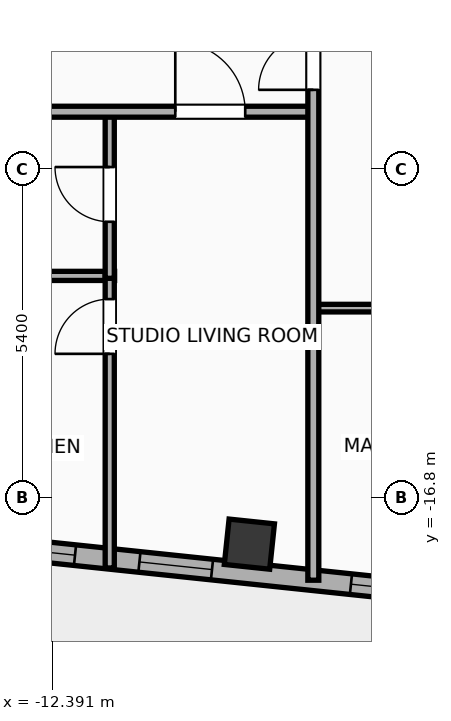
"""IFC4 building model, lengths in metres.
Left out: names, types, materials, properties, quantities, classifications, styles, units other than length and angle.
Written with IfcOpenShell. Run it as: python <this file> out.ifc"""

import sys

from ifc_helpers import new_model, si_unit, direction, frame, frame_2d, origin, origin_2d, place, context, subcontext, project, spatial, rectangle, hollow_rectangle, extrude, element, fill, save


model = new_model("IFC4")
c1 = context("Model", 3, precision=1e-05, world=origin(), true_north=direction((0.0, 1.0)))
c2 = subcontext(c1, "Body", "Model", "MODEL_VIEW")
j1 = project(units=[si_unit("LENGTHUNIT", "METRE"), si_unit("PLANEANGLEUNIT", "RADIAN")], contexts=[c1])
p1 = place(None, origin())
s1 = spatial("IfcSite", under=j1, at=p1, CompositionType="ELEMENT")
p2 = place(p1, origin())
s2 = spatial("IfcBuilding", under=s1, at=p2, CompositionType="ELEMENT")
p3 = place(p2, frame((0.0, 0.0, 291.2)))
s3 = spatial("IfcBuildingStorey", under=s2, at=p3, CompositionType="ELEMENT", Elevation=291.2)
p4 = place(p3, frame((-9.152, -17.561, 0.0), z_axis=(0.0, 0.0, 1.0), x_axis=(0.994521895368, -0.104528463268, 0.0)))
e1 = element("IfcColumn", 1, at=p4, inside=s3, PredefinedType="COLUMN", context=c2, shape_type="SweptSolid", body=[
    extrude(hollow_rectangle(XDim=0.75, YDim=0.75, WallThickness=0.025, at=origin_2d()), origin(), (0.0, 0.0, 1.0), 3.9),
])
p5 = place(p3, frame((18.708, -20.972, 0.0), z_axis=(0.0, 0.0, 1.0), x_axis=(-0.994521888554, 0.104528528102, 0.0)))
e2 = element("IfcWall", 2, at=p5, inside=s3, PredefinedType="ELEMENTEDWALL", context=c2, shape_type="SweptSolid", body=[
    extrude(rectangle(XDim=46.766, YDim=0.34, at=frame_2d((23.383, 0.0))), origin(), (0.0, 0.0, 1.0), 3.635),
])
p6 = place(p5, frame((23.733, 0.0, 0.65)))
e3 = element("IfcOpeningElement", 3, at=p6, cuts=e2, PredefinedType="OPENING", context=c2, shape_type="SweptSolid", body=[
    extrude(rectangle(XDim=2.6, YDim=2.45, at=frame_2d((1.3, 1.225))), frame((0.0, 0.18, 0.0), z_axis=(0.0, -1.0, 0.0), x_axis=(1.0, 0.0, 0.0)), (0.0, 0.0, 1.0), 0.36),
])
p7 = place(p5, frame((44.402, 0.0, 0.75)))
e4 = element("IfcOpeningElement", 4, at=p7, cuts=e2, PredefinedType="OPENING", context=c2, shape_type="SweptSolid", body=[
    extrude(rectangle(XDim=1.2, YDim=2.05, at=frame_2d((0.6, 1.025))), frame((0.0, 0.18, 0.0), z_axis=(0.0, -1.0, 0.0), x_axis=(1.0, 0.0, 0.0)), (0.0, 0.0, 1.0), 0.36),
])
p8 = place(p5, frame((39.54, 0.0, 0.75)))
e5 = element("IfcOpeningElement", 5, at=p8, cuts=e2, PredefinedType="OPENING", context=c2, shape_type="SweptSolid", body=[
    extrude(rectangle(XDim=1.2, YDim=2.05, at=frame_2d((0.6, 1.025))), frame((0.0, 0.18, 0.0), z_axis=(0.0, -1.0, 0.0), x_axis=(1.0, 0.0, 0.0)), (0.0, 0.0, 1.0), 0.36),
])
p9 = place(p5, frame((42.406, 0.0, 0.75)))
e6 = element("IfcOpeningElement", 6, at=p9, cuts=e2, PredefinedType="OPENING", context=c2, shape_type="SweptSolid", body=[
    extrude(rectangle(XDim=1.2, YDim=2.05, at=frame_2d((0.6, 1.025))), frame((0.0, 0.18, 0.0), z_axis=(0.0, -1.0, 0.0), x_axis=(1.0, 0.0, 0.0)), (0.0, 0.0, 1.0), 0.36),
])
p10 = place(p5, frame((34.933, 0.0, 0.75)))
e7 = element("IfcOpeningElement", 7, at=p10, cuts=e2, PredefinedType="OPENING", context=c2, shape_type="SweptSolid", body=[
    extrude(rectangle(XDim=1.2, YDim=2.05, at=frame_2d((0.6, 1.025))), frame((0.0, 0.18, 0.0), z_axis=(0.0, -1.0, 0.0), x_axis=(1.0, 0.0, 0.0)), (0.0, 0.0, 1.0), 0.36),
])
p11 = place(p5, frame((28.631, 0.0, 0.75)))
e8 = element("IfcOpeningElement", 8, at=p11, cuts=e2, PredefinedType="OPENING", context=c2, shape_type="SweptSolid", body=[
    extrude(rectangle(XDim=1.2, YDim=2.05, at=frame_2d((0.6, 1.025))), frame((0.0, 0.18, 0.0), z_axis=(0.0, -1.0, 0.0), x_axis=(1.0, 0.0, 0.0)), (0.0, 0.0, 1.0), 0.36),
])
p12 = place(p5, frame((30.896, 0.0, 0.75)))
e9 = element("IfcOpeningElement", 9, at=p12, cuts=e2, PredefinedType="OPENING", context=c2, shape_type="SweptSolid", body=[
    extrude(rectangle(XDim=1.2, YDim=2.05, at=frame_2d((0.6, 1.025))), frame((0.0, 0.18, 0.0), z_axis=(0.0, -1.0, 0.0), x_axis=(1.0, 0.0, 0.0)), (0.0, 0.0, 1.0), 0.36),
])
p13 = place(p5, frame((7.501, 0.0, 0.75)))
e10 = element("IfcOpeningElement", 10, at=p13, cuts=e2, PredefinedType="OPENING", context=c2, shape_type="SweptSolid", body=[
    extrude(rectangle(XDim=1.2, YDim=2.05, at=frame_2d((0.6, 1.025))), frame((0.0, 0.18, 0.0), z_axis=(0.0, -1.0, 0.0), x_axis=(1.0, 0.0, 0.0)), (0.0, 0.0, 1.0), 0.36),
])
p14 = place(p5, frame((4.159, 0.0, 0.75)))
e11 = element("IfcOpeningElement", 11, at=p14, cuts=e2, PredefinedType="OPENING", context=c2, shape_type="SweptSolid", body=[
    extrude(rectangle(XDim=1.2, YDim=2.05, at=frame_2d((0.6, 1.025))), frame((0.0, 0.18, 0.0), z_axis=(0.0, -1.0, 0.0), x_axis=(1.0, 0.0, 0.0)), (0.0, 0.0, 1.0), 0.36),
])
p15 = place(p5, frame((1.369, 0.0, 0.75)))
e12 = element("IfcOpeningElement", 12, at=p15, cuts=e2, PredefinedType="OPENING", context=c2, shape_type="SweptSolid", body=[
    extrude(rectangle(XDim=1.2, YDim=2.05, at=frame_2d((0.6, 1.025))), frame((0.0, 0.18, 0.0), z_axis=(0.0, -1.0, 0.0), x_axis=(1.0, 0.0, 0.0)), (0.0, 0.0, 1.0), 0.36),
])
p16 = place(p5, frame((20.254, 0.0, 0.75)))
e13 = element("IfcOpeningElement", 13, at=p16, cuts=e2, PredefinedType="OPENING", context=c2, shape_type="SweptSolid", body=[
    extrude(rectangle(XDim=1.2, YDim=2.05, at=frame_2d((0.6, 1.025))), frame((0.0, 0.18, 0.0), z_axis=(0.0, -1.0, 0.0), x_axis=(1.0, 0.0, 0.0)), (0.0, 0.0, 1.0), 0.36),
])
p17 = place(p5, frame((16.172, 0.0, 0.75)))
e14 = element("IfcOpeningElement", 14, at=p17, cuts=e2, PredefinedType="OPENING", context=c2, shape_type="SweptSolid", body=[
    extrude(rectangle(XDim=1.2, YDim=2.05, at=frame_2d((0.6, 1.025))), frame((0.0, 0.18, 0.0), z_axis=(0.0, -1.0, 0.0), x_axis=(1.0, 0.0, 0.0)), (0.0, 0.0, 1.0), 0.36),
])
p18 = place(p5, frame((12.11, 0.0, 0.75)))
e15 = element("IfcOpeningElement", 15, at=p18, cuts=e2, PredefinedType="OPENING", context=c2, shape_type="SweptSolid", body=[
    extrude(rectangle(XDim=1.2, YDim=2.05, at=frame_2d((0.6, 1.025))), frame((0.0, 0.18, 0.0), z_axis=(0.0, -1.0, 0.0), x_axis=(1.0, 0.0, 0.0)), (0.0, 0.0, 1.0), 0.36),
])
p19 = place(p3, frame((-14.039, -13.15, 0.0), z_axis=(0.0, 0.0, 1.0), x_axis=(1.0, 0.0, 0.0)))
e16 = element("IfcWall", 16, at=p19, inside=s3, PredefinedType="PLUMBINGWALL", context=c2, shape_type="SweptSolid", body=[
    extrude(rectangle(XDim=2.671, YDim=0.15, at=frame_2d((1.335, 0.0))), origin(), (0.0, 0.0, 1.0), 3.635),
])
p20 = place(p3, frame((-11.448, -17.954, 0.0), z_axis=(0.0, 0.0, 1.0), x_axis=(0.0, 1.0, 0.0)))
e17 = element("IfcWall", 17, at=p20, inside=s3, PredefinedType="PLUMBINGWALL", context=c2, shape_type="SweptSolid", body=[
    extrude(rectangle(XDim=4.844, YDim=0.15, at=frame_2d((2.422, 0.0))), origin(), (0.0, 0.0, 1.0), 3.635),
])
p21 = place(p20, frame((3.522, 0.0, 0.0)))
e18 = element("IfcOpeningElement", 18, at=p21, cuts=e17, PredefinedType="OPENING", context=c2, shape_type="SweptSolid", body=[
    extrude(rectangle(XDim=0.9, YDim=2.05, at=frame_2d((0.45, 1.025))), frame((0.0, 0.085, 0.0), z_axis=(0.0, -1.0, 0.0), x_axis=(1.0, 0.0, 0.0)), (0.0, 0.0, 1.0), 0.17),
])
p22 = place(p3, frame((-11.448, -13.19, 0.0), z_axis=(0.0, 0.0, 1.0), x_axis=(0.0, 1.0, 0.0)))
e19 = element("IfcWall", 19, at=p22, inside=s3, PredefinedType="PLUMBINGWALL", context=c2, shape_type="SweptSolid", body=[
    extrude(rectangle(XDim=2.76, YDim=0.15, at=frame_2d((1.38, 0.0))), origin(), (0.0, 0.0, 1.0), 3.075),
])
p23 = place(p22, frame((0.93, 0.0, 0.0)))
e20 = element("IfcOpeningElement", 20, at=p23, cuts=e19, PredefinedType="OPENING", context=c2, shape_type="SweptSolid", body=[
    extrude(rectangle(XDim=0.9, YDim=2.05, at=frame_2d((0.45, 1.025))), frame((0.0, 0.085, 0.0), z_axis=(0.0, -1.0, 0.0), x_axis=(1.0, 0.0, 0.0)), (0.0, 0.0, 1.0), 0.17),
])
p24 = place(p3, frame((-30.676, -10.45, 0.0), z_axis=(0.0, 0.0, 1.0), x_axis=(1.0, 0.0, 0.0)))
e21 = element("IfcWall", 21, at=p24, inside=s3, PredefinedType="PARTITIONING", context=c2, shape_type="SweptSolid", body=[
    extrude(rectangle(XDim=22.596, YDim=0.18, at=frame_2d((11.298, 0.0))), origin(), (0.0, 0.0, 1.0), 3.635),
])
p25 = place(p24, frame((2.336, 0.0, 0.0)))
e22 = element("IfcOpeningElement", 22, at=p25, cuts=e21, PredefinedType="OPENING", context=c2, shape_type="SweptSolid", body=[
    extrude(rectangle(XDim=0.9, YDim=2.05, at=frame_2d((0.45, 1.025))), frame((0.0, 0.1, 0.0), z_axis=(0.0, -1.0, 0.0), x_axis=(1.0, 0.0, 0.0)), (0.0, 0.0, 1.0), 0.2),
])
p26 = place(p24, frame((8.861, 0.0, 0.0)))
e23 = element("IfcOpeningElement", 23, at=p26, cuts=e21, PredefinedType="OPENING", context=c2, shape_type="SweptSolid", body=[
    extrude(rectangle(XDim=1.15, YDim=2.05, at=frame_2d((0.575, 1.025))), frame((0.0, 0.1, 0.0), z_axis=(0.0, -1.0, 0.0), x_axis=(1.0, 0.0, 0.0)), (0.0, 0.0, 1.0), 0.2),
])
p27 = place(p24, frame((13.774, 0.0, 0.0)))
e24 = element("IfcOpeningElement", 24, at=p27, cuts=e21, PredefinedType="OPENING", context=c2, shape_type="SweptSolid", body=[
    extrude(rectangle(XDim=0.9, YDim=2.05, at=frame_2d((0.45, 1.025))), frame((0.0, 0.1, 0.0), z_axis=(0.0, -1.0, 0.0), x_axis=(1.0, 0.0, 0.0)), (0.0, 0.0, 1.0), 0.2),
])
p28 = place(p24, frame((20.306, 0.0, 0.0)))
e25 = element("IfcOpeningElement", 25, at=p28, cuts=e21, PredefinedType="OPENING", context=c2, shape_type="SweptSolid", body=[
    extrude(rectangle(XDim=1.15, YDim=2.05, at=frame_2d((0.575, 1.025))), frame((0.0, 0.1, 0.0), z_axis=(0.0, -1.0, 0.0), x_axis=(1.0, 0.0, 0.0)), (0.0, 0.0, 1.0), 0.2),
])
p29 = place(p3, frame((-8.08, -13.68, 0.0), z_axis=(0.0, 0.0, 1.0), x_axis=(1.0, 0.0, 0.0)))
e26 = element("IfcWall", 26, at=p29, inside=s3, PredefinedType="PARTITIONING", context=c2, shape_type="SweptSolid", body=[
    extrude(rectangle(XDim=8.06, YDim=0.125, at=frame_2d((4.03, 0.0))), origin(), (0.0, 0.0, 1.0), 3.635),
])
p30 = place(p29, frame((1.323, 0.0, 0.0)))
e27 = element("IfcOpeningElement", 27, at=p30, cuts=e26, PredefinedType="OPENING", context=c2, shape_type="SweptSolid", body=[
    extrude(rectangle(XDim=0.9, YDim=2.05, at=frame_2d((0.45, 1.025))), frame((0.0, 0.073, 0.0), z_axis=(0.0, -1.0, 0.0), x_axis=(1.0, 0.0, 0.0)), (0.0, 0.0, 1.0), 0.145),
])
p31 = place(p29, frame((4.547, 0.0, 0.0)))
e28 = element("IfcOpeningElement", 28, at=p31, cuts=e26, PredefinedType="OPENING", context=c2, shape_type="SweptSolid", body=[
    extrude(rectangle(XDim=0.9, YDim=2.05, at=frame_2d((0.45, 1.025))), frame((0.0, 0.073, 0.0), z_axis=(0.0, -1.0, 0.0), x_axis=(1.0, 0.0, 0.0)), (0.0, 0.0, 1.0), 0.145),
])
p32 = place(p3, frame((-8.1, -18.155, 0.0), z_axis=(0.0, 0.0, 1.0), x_axis=(0.0, 1.0, 0.0)))
e29 = element("IfcWall", 29, at=p32, inside=s3, PredefinedType="PARTITIONING", context=c2, shape_type="SweptSolid", body=[
    extrude(rectangle(XDim=9.314, YDim=0.18, at=frame_2d((4.657, 0.0))), origin(), (0.0, 0.0, 1.0), 3.635),
])
p33 = place(p32, frame((8.064, 0.0, 0.0)))
e30 = element("IfcOpeningElement", 30, at=p33, cuts=e29, PredefinedType="OPENING", context=c2, shape_type="SweptSolid", body=[
    extrude(rectangle(XDim=0.9, YDim=2.05, at=frame_2d((0.45, 1.025))), frame((0.0, 0.1, 0.0), z_axis=(0.0, -1.0, 0.0), x_axis=(1.0, 0.0, 0.0)), (0.0, 0.0, 1.0), 0.2),
])
p34 = place(p6, origin())
e31 = element("IfcWindow", 31, at=p34, inside=s3, PartitioningType="SINGLE_PANEL", PredefinedType="WINDOW", context=c2, shape_type="SweptSolid", body=[
    extrude(rectangle(XDim=2.6, YDim=2.45, at=frame_2d((1.3, 1.225))), frame((0.0, 0.03, 0.0), z_axis=(0.0, -1.0, 0.0), x_axis=(1.0, 0.0, 0.0)), (0.0, 0.0, 1.0), 0.06),
])
fill(e3, e31)
p35 = place(p11, origin())
e32 = element("IfcWindow", 32, at=p35, inside=s3, PartitioningType="SINGLE_PANEL", PredefinedType="WINDOW", context=c2, shape_type="SweptSolid", body=[
    extrude(rectangle(XDim=1.2, YDim=2.05, at=frame_2d((0.6, 1.025))), frame((0.0, 0.03, 0.0), z_axis=(0.0, -1.0, 0.0), x_axis=(1.0, 0.0, 0.0)), (0.0, 0.0, 1.0), 0.06),
])
fill(e8, e32)
p36 = place(p12, origin())
e33 = element("IfcWindow", 33, at=p36, inside=s3, PartitioningType="SINGLE_PANEL", PredefinedType="WINDOW", context=c2, shape_type="SweptSolid", body=[
    extrude(rectangle(XDim=1.2, YDim=2.05, at=frame_2d((0.6, 1.025))), frame((0.0, 0.03, 0.0), z_axis=(0.0, -1.0, 0.0), x_axis=(1.0, 0.0, 0.0)), (0.0, 0.0, 1.0), 0.06),
])
fill(e9, e33)
p37 = place(p21, origin())
e34 = element("IfcDoor", 34, at=p37, inside=s3, OperationType="SINGLE_SWING_LEFT", PredefinedType="DOOR", context=c2, shape_type="SweptSolid", body=[
    extrude(rectangle(XDim=0.9, YDim=2.05, at=frame_2d((0.45, 1.025))), frame((0.0, 0.025, 0.0), z_axis=(0.0, -1.0, 0.0), x_axis=(1.0, 0.0, 0.0)), (0.0, 0.0, 1.0), 0.05),
])
fill(e18, e34)
p38 = place(p23, origin())
e35 = element("IfcDoor", 35, at=p38, inside=s3, OperationType="SINGLE_SWING_RIGHT", PredefinedType="DOOR", context=c2, shape_type="SweptSolid", body=[
    extrude(rectangle(XDim=0.9, YDim=2.05, at=frame_2d((0.45, 1.025))), frame((0.0, 0.025, 0.0), z_axis=(0.0, -1.0, 0.0), x_axis=(1.0, 0.0, 0.0)), (0.0, 0.0, 1.0), 0.05),
])
fill(e20, e35)
p39 = place(p28, origin())
e36 = element("IfcDoor", 36, at=p39, inside=s3, OperationType="SINGLE_SWING_LEFT", PredefinedType="DOOR", context=c2, shape_type="SweptSolid", body=[
    extrude(rectangle(XDim=1.15, YDim=2.05, at=frame_2d((0.575, 1.025))), frame((0.0, 0.025, 0.0), z_axis=(0.0, -1.0, 0.0), x_axis=(1.0, 0.0, 0.0)), (0.0, 0.0, 1.0), 0.05),
])
fill(e25, e36)
p40 = place(p33, origin())
e37 = element("IfcDoor", 37, at=p40, inside=s3, OperationType="SINGLE_SWING_LEFT", PredefinedType="DOOR", context=c2, shape_type="SweptSolid", body=[
    extrude(rectangle(XDim=0.9, YDim=2.05, at=frame_2d((0.45, 1.025))), frame((0.0, 0.025, 0.0), z_axis=(0.0, -1.0, 0.0), x_axis=(1.0, 0.0, 0.0)), (0.0, 0.0, 1.0), 0.05),
])
fill(e30, e37)
save(model, sys.argv[1])
